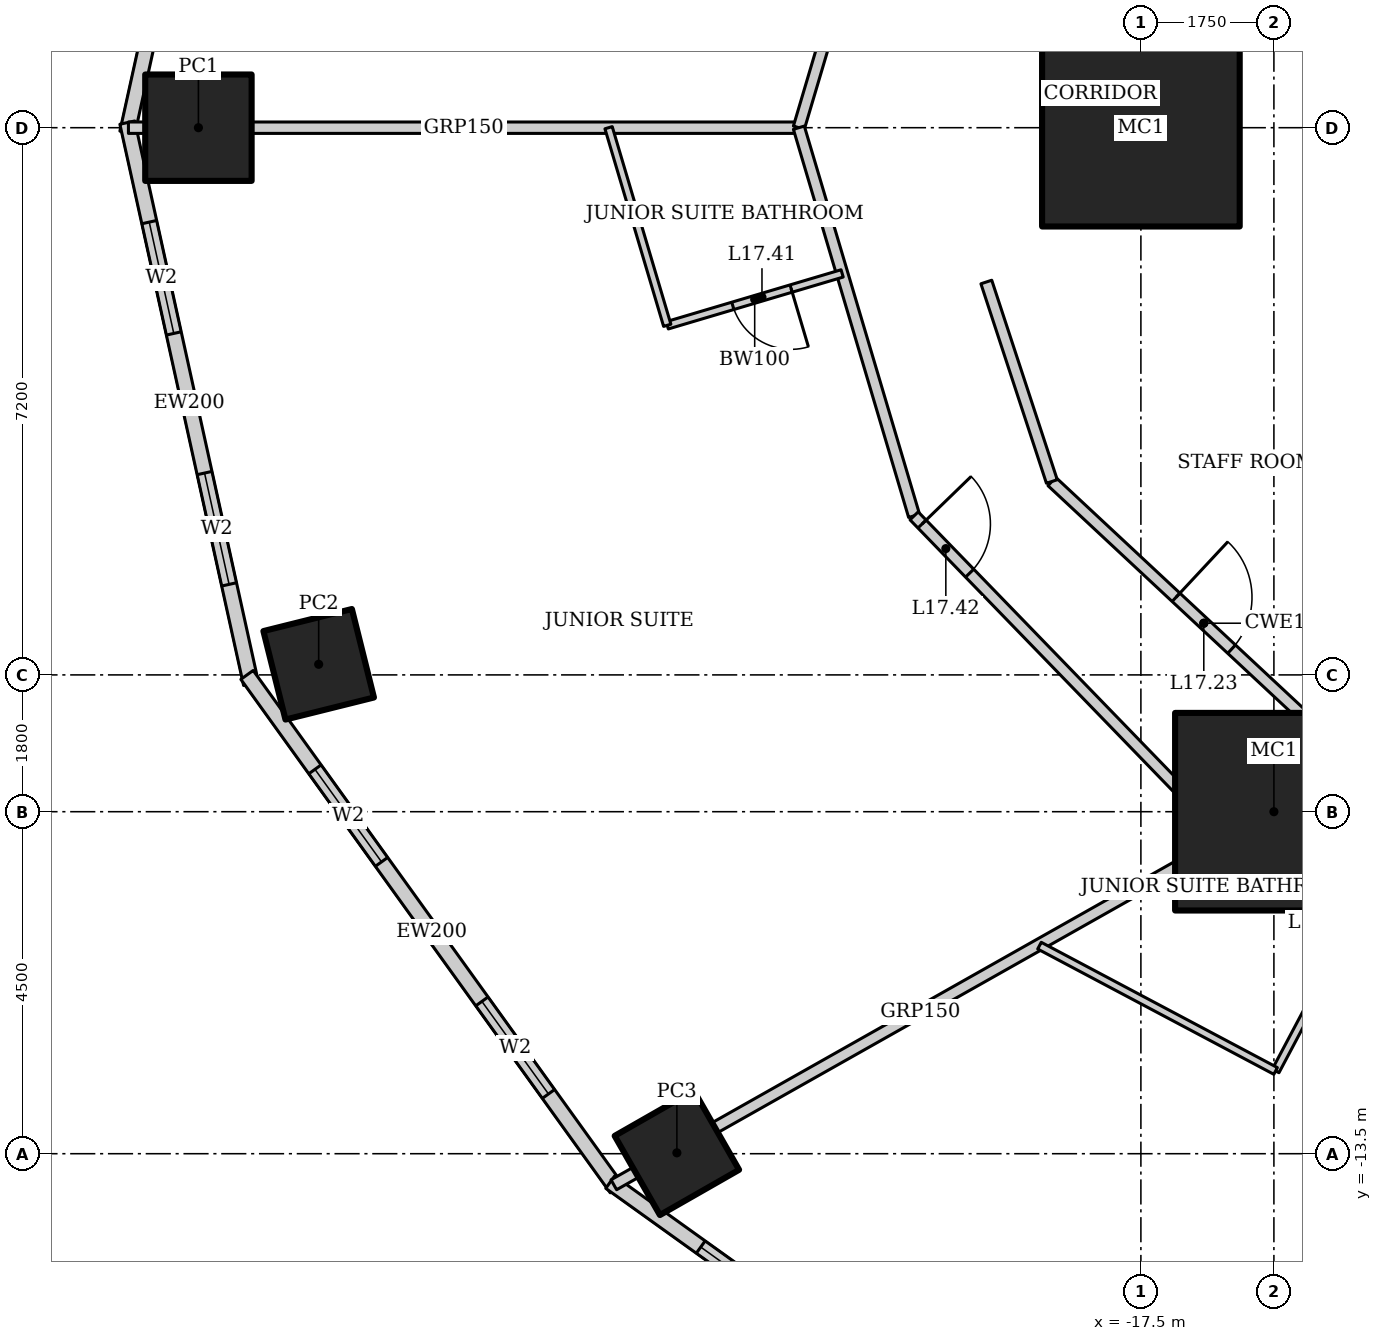
"""IFC4 building model, lengths in metres.
Left out: names, types, materials, properties, quantities, classifications, styles, units other than length and angle.
Written with IfcOpenShell. Run it as: python <this file> out.ifc"""

import sys

from ifc_helpers import new_model, si_unit, direction, frame, frame_2d, origin, origin_2d, place, context, subcontext, project, spatial, rectangle, hollow_rectangle, extrude, element, fill, save


model = new_model("IFC4")
c1 = context("Model", 3, precision=1e-05, world=origin(), true_north=direction((0.0, 1.0)))
c2 = subcontext(c1, "Body", "Model", "MODEL_VIEW")
j1 = project(units=[si_unit("LENGTHUNIT", "METRE"), si_unit("PLANEANGLEUNIT", "RADIAN")], contexts=[c1])
p1 = place(None, origin())
s1 = spatial("IfcSite", under=j1, at=p1, CompositionType="ELEMENT")
p2 = place(p1, origin())
s2 = spatial("IfcBuilding", under=s1, at=p2, CompositionType="ELEMENT")
p3 = place(p2, frame((0.0, 0.0, 76.6)))
s3 = spatial("IfcBuildingStorey", under=s2, at=p3, CompositionType="ELEMENT", Elevation=76.6)
for number, where, z_axis, x_axis in (
    (1, (-17.5, 0.0, 0.0), (0.0, 0.0, 1.0), (1.0, 0.0, 0.0)),
    (2, (-15.75, -9.0, 0.0), (0.0, 0.0, 1.0), (1.0, 0.0, 0.0)),
):
    element("IfcColumn", number, at=place(p3, frame(where, z_axis=z_axis, x_axis=x_axis)), inside=s3, PredefinedType="COLUMN", context=c2, shape_type="SweptSolid", body=[
        extrude(hollow_rectangle(XDim=2.6, YDim=2.6, WallThickness=0.13, at=origin_2d()), origin(), (0.0, 0.0, 1.0), 3.6),
    ])
p4 = place(p3, frame((-29.9, 0.0, 0.0), z_axis=(0.0, 0.0, 1.0), x_axis=(1.0, 0.0, 0.0)))
e3 = element("IfcColumn", 3, at=p4, inside=s3, PredefinedType="COLUMN", context=c2, shape_type="SweptSolid", body=[
    extrude(hollow_rectangle(XDim=1.4, YDim=1.4, WallThickness=0.1, at=origin_2d()), origin(), (0.0, 0.0, 1.0), 3.6),
])
p5 = place(p3, frame((-28.318, -7.06, 0.0), z_axis=(0.0, 0.0, 1.0), x_axis=(0.970295726276, 0.2419218956, 0.0)))
e4 = element("IfcColumn", 4, at=p5, inside=s3, PredefinedType="COLUMN", context=c2, shape_type="SweptSolid", body=[
    extrude(hollow_rectangle(XDim=1.2, YDim=1.2, WallThickness=0.1, at=origin_2d()), origin(), (0.0, 0.0, 1.0), 3.6),
])
p6 = place(p3, frame((-23.605, -13.489, 0.0), z_axis=(0.0, 0.0, 1.0), x_axis=(0.86824298017, 0.496139221777, 0.0)))
e5 = element("IfcColumn", 5, at=p6, inside=s3, PredefinedType="COLUMN", context=c2, shape_type="SweptSolid", body=[
    extrude(hollow_rectangle(XDim=1.2, YDim=1.2, WallThickness=0.12, at=origin_2d()), origin(), (0.0, 0.0, 1.0), 3.6),
])
p7 = place(p3, frame((-29.208, 7.318, 0.0), z_axis=(0.0, 0.0, 1.0), x_axis=(-0.215238065514, -0.976561608478, 0.0)))
e6 = element("IfcWall", 6, at=p7, inside=s3, PredefinedType="SOLIDWALL", context=c2, shape_type="SweptSolid", body=[
    extrude(rectangle(XDim=7.562, YDim=0.2, at=frame_2d((3.781, 0.0))), origin(), (0.0, 0.0, 1.0), 3.45),
])
p8 = place(p7, frame((1.341, 0.0, 0.5)))
e7 = element("IfcOpeningElement", 7, at=p8, cuts=e6, PredefinedType="OPENING", context=c2, shape_type="SweptSolid", body=[
    extrude(rectangle(XDim=1.5, YDim=2.2, at=frame_2d((0.75, 1.1))), frame((0.0, 0.11, 0.0), z_axis=(0.0, -1.0, 0.0), x_axis=(1.0, 0.0, 0.0)), (0.0, 0.0, 1.0), 0.22),
])
p9 = place(p7, frame((4.722, 0.0, 0.5)))
e8 = element("IfcOpeningElement", 8, at=p9, cuts=e6, PredefinedType="OPENING", context=c2, shape_type="SweptSolid", body=[
    extrude(rectangle(XDim=1.5, YDim=2.2, at=frame_2d((0.75, 1.1))), frame((0.0, 0.11, 0.0), z_axis=(0.0, -1.0, 0.0), x_axis=(1.0, 0.0, 0.0)), (0.0, 0.0, 1.0), 0.22),
])
p10 = place(p3, frame((-30.835, 0.067, 0.0), z_axis=(0.0, 0.0, 1.0), x_axis=(0.215238065514, -0.976561608478, 0.0)))
e9 = element("IfcWall", 9, at=p10, inside=s3, PredefinedType="SOLIDWALL", context=c2, shape_type="SweptSolid", body=[
    extrude(rectangle(XDim=7.562, YDim=0.2, at=frame_2d((3.781, 0.0))), origin(), (0.0, 0.0, 1.0), 3.45),
])
p11 = place(p10, frame((1.341, 0.0, 0.5)))
e10 = element("IfcOpeningElement", 10, at=p11, cuts=e9, PredefinedType="OPENING", context=c2, shape_type="SweptSolid", body=[
    extrude(rectangle(XDim=1.5, YDim=2.2, at=frame_2d((0.75, 1.1))), frame((0.0, 0.11, 0.0), z_axis=(0.0, -1.0, 0.0), x_axis=(1.0, 0.0, 0.0)), (0.0, 0.0, 1.0), 0.22),
])
p12 = place(p10, frame((4.722, 0.0, 0.5)))
e11 = element("IfcOpeningElement", 11, at=p12, cuts=e9, PredefinedType="OPENING", context=c2, shape_type="SweptSolid", body=[
    extrude(rectangle(XDim=1.5, YDim=2.2, at=frame_2d((0.75, 1.1))), frame((0.0, 0.11, 0.0), z_axis=(0.0, -1.0, 0.0), x_axis=(1.0, 0.0, 0.0)), (0.0, 0.0, 1.0), 0.22),
])
p13 = place(p3, frame((-29.26, -7.2, 0.0), z_axis=(0.0, 0.0, 1.0), x_axis=(0.583937613703, -0.811798536155, 0.0)))
e12 = element("IfcWall", 12, at=p13, inside=s3, PredefinedType="SOLIDWALL", context=c2, shape_type="SweptSolid", body=[
    extrude(rectangle(XDim=8.323, YDim=0.2, at=frame_2d((4.162, 0.0))), origin(), (0.0, 0.0, 1.0), 3.45),
])
p14 = place(p13, frame((1.531, 0.0, 0.5)))
e13 = element("IfcOpeningElement", 13, at=p14, cuts=e12, PredefinedType="OPENING", context=c2, shape_type="SweptSolid", body=[
    extrude(rectangle(XDim=1.5, YDim=2.2, at=frame_2d((0.75, 1.1))), frame((0.0, 0.11, 0.0), z_axis=(0.0, -1.0, 0.0), x_axis=(1.0, 0.0, 0.0)), (0.0, 0.0, 1.0), 0.22),
])
p15 = place(p13, frame((5.292, 0.0, 0.5)))
e14 = element("IfcOpeningElement", 14, at=p15, cuts=e12, PredefinedType="OPENING", context=c2, shape_type="SweptSolid", body=[
    extrude(rectangle(XDim=1.5, YDim=2.2, at=frame_2d((0.75, 1.1))), frame((0.0, 0.11, 0.0), z_axis=(0.0, -1.0, 0.0), x_axis=(1.0, 0.0, 0.0)), (0.0, 0.0, 1.0), 0.22),
])
p16 = place(p3, frame((-24.482, -13.875, 0.0), z_axis=(0.0, 0.0, 1.0), x_axis=(0.812791321576, -0.582554948112, 0.0)))
e15 = element("IfcWall", 15, at=p16, inside=s3, PredefinedType="SOLIDWALL", context=c2, shape_type="SweptSolid", body=[
    extrude(rectangle(XDim=8.063, YDim=0.2, at=frame_2d((4.032, 0.0))), origin(), (0.0, 0.0, 1.0), 3.45),
])
p17 = place(p16, frame((1.466, 0.0, 0.5)))
e16 = element("IfcOpeningElement", 16, at=p17, cuts=e15, PredefinedType="OPENING", context=c2, shape_type="SweptSolid", body=[
    extrude(rectangle(XDim=1.5, YDim=2.2, at=frame_2d((0.75, 1.1))), frame((0.0, 0.11, 0.0), z_axis=(0.0, -1.0, 0.0), x_axis=(1.0, 0.0, 0.0)), (0.0, 0.0, 1.0), 0.22),
])
p18 = place(p16, frame((5.097, 0.0, 0.5)))
e17 = element("IfcOpeningElement", 17, at=p18, cuts=e15, PredefinedType="OPENING", context=c2, shape_type="SweptSolid", body=[
    extrude(rectangle(XDim=1.5, YDim=2.2, at=frame_2d((0.75, 1.1))), frame((0.0, 0.11, 0.0), z_axis=(0.0, -1.0, 0.0), x_axis=(1.0, 0.0, 0.0)), (0.0, 0.0, 1.0), 0.22),
])
p19 = place(p3, frame((-30.821, 0.0, 0.0), z_axis=(0.0, 0.0, 1.0), x_axis=(1.0, 0.0, 0.0)))
e18 = element("IfcWall", 18, at=p19, inside=s3, PredefinedType="PARTITIONING", context=c2, shape_type="SweptSolid", body=[
    extrude(rectangle(XDim=8.821, YDim=0.15, at=frame_2d((4.41, 0.0))), origin(), (0.0, 0.0, 1.0), 2.528),
])
p20 = place(p3, frame((-24.435, -13.909, 0.0), z_axis=(0.0, 0.0, 1.0), x_axis=(0.870744406136, 0.491735883563, 0.0)))
e19 = element("IfcWall", 19, at=p20, inside=s3, PredefinedType="PARTITIONING", context=c2, shape_type="SweptSolid", body=[
    extrude(rectangle(XDim=9.263, YDim=0.15, at=frame_2d((4.631, 0.0))), origin(), (0.0, 0.0, 1.0), 2.693),
])
p21 = place(p3, frame((-20.484, 5.107, 0.0), z_axis=(0.0, 0.0, 1.0), x_axis=(-0.284584469409, -0.95865096869, 0.0)))
e20 = element("IfcWall", 20, at=p21, inside=s3, PredefinedType="PARTITIONING", context=c2, shape_type="SweptSolid", body=[
    extrude(rectangle(XDim=5.327, YDim=0.15, at=frame_2d((2.664, 0.0))), origin(), (0.0, 0.0, 1.0), 3.45),
])
p22 = place(p21, frame((0.15, 0.0, 0.0)))
e21 = element("IfcOpeningElement", 21, at=p22, cuts=e20, PredefinedType="OPENING", context=c2, shape_type="SweptSolid", body=[
    extrude(rectangle(XDim=0.9, YDim=2.1, at=frame_2d((0.45, 1.05))), frame((0.0, 0.085, 0.0), z_axis=(0.0, -1.0, 0.0), x_axis=(1.0, 0.0, 0.0)), (0.0, 0.0, 1.0), 0.17),
])
p23 = place(p3, frame((-22.0, 0.0, 0.0), z_axis=(0.0, 0.0, 1.0), x_axis=(0.284584469409, -0.95865096869, 0.0)))
e22 = element("IfcWall", 22, at=p23, inside=s3, PredefinedType="PARTITIONING", context=c2, shape_type="SweptSolid", body=[
    extrude(rectangle(XDim=5.327, YDim=0.15, at=frame_2d((2.664, 0.0))), origin(), (0.0, 0.0, 1.0), 3.45),
])
p24 = place(p3, frame((-20.484, -5.107, 0.0), z_axis=(0.0, 0.0, 1.0), x_axis=(0.695871090686, -0.71816671125, 0.0)))
e23 = element("IfcWall", 23, at=p24, inside=s3, PredefinedType="PARTITIONING", context=c2, shape_type="SweptSolid", body=[
    extrude(rectangle(XDim=5.913, YDim=0.15, at=frame_2d((2.957, 0.0))), origin(), (0.0, 0.0, 1.0), 3.45),
])
p25 = place(p24, frame((0.15, 0.0, 0.0)))
e24 = element("IfcOpeningElement", 24, at=p25, cuts=e23, PredefinedType="OPENING", context=c2, shape_type="SweptSolid", body=[
    extrude(rectangle(XDim=0.9, YDim=2.1, at=frame_2d((0.45, 1.05))), frame((0.0, 0.085, 0.0), z_axis=(0.0, -1.0, 0.0), x_axis=(1.0, 0.0, 0.0)), (0.0, 0.0, 1.0), 0.17),
])
p26 = place(p3, frame((-16.369, -9.354, 0.0), z_axis=(0.0, 0.0, 1.0), x_axis=(0.883334368785, -0.468743419071, 0.0)))
e25 = element("IfcWall", 25, at=p26, inside=s3, PredefinedType="PARTITIONING", context=c2, shape_type="SweptSolid", body=[
    extrude(rectangle(XDim=5.491, YDim=0.15, at=frame_2d((2.746, 0.0))), origin(), (0.0, 0.0, 1.0), 3.45),
])
p27 = place(p3, frame((-18.672, -4.655, 0.0), z_axis=(0.0, 0.0, 1.0), x_axis=(0.731260145007, -0.682098673452, 0.0)))
e26 = element("IfcWall", 26, at=p27, inside=s3, PredefinedType="PARTITIONING", context=c2, shape_type="SweptSolid", body=[
    extrude(rectangle(XDim=5.468, YDim=0.15, at=frame_2d((2.734, 0.0))), origin(), (0.0, 0.0, 1.0), 3.45),
])
p28 = place(p27, frame((2.234, 0.0, 0.0)))
e27 = element("IfcOpeningElement", 27, at=p28, cuts=e26, PredefinedType="OPENING", context=c2, shape_type="SweptSolid", body=[
    extrude(rectangle(XDim=1.0, YDim=2.1, at=frame_2d((0.5, 1.05))), frame((0.0, 0.085, 0.0), z_axis=(0.0, -1.0, 0.0), x_axis=(1.0, 0.0, 0.0)), (0.0, 0.0, 1.0), 0.17),
])
p29 = place(p3, frame((-21.431, -1.917, 0.0), z_axis=(0.0, 0.0, 1.0), x_axis=(-0.958639927723, -0.284621659356, 0.0)))
e28 = element("IfcWall", 28, at=p29, inside=s3, PredefinedType="PARTITIONING", context=c2, shape_type="SweptSolid", body=[
    extrude(rectangle(XDim=2.4, YDim=0.1, at=frame_2d((1.2, 0.0))), origin(), (0.0, 0.0, 1.0), 3.45),
])
p30 = place(p29, frame((0.7, 0.0, 0.0)))
e29 = element("IfcOpeningElement", 29, at=p30, cuts=e28, PredefinedType="OPENING", context=c2, shape_type="SweptSolid", body=[
    extrude(rectangle(XDim=0.8, YDim=2.1, at=frame_2d((0.4, 1.05))), frame((0.0, 0.06, 0.0), z_axis=(0.0, -1.0, 0.0), x_axis=(1.0, 0.0, 0.0)), (0.0, 0.0, 1.0), 0.12),
])
p31 = place(p3, frame((-23.732, -2.6, 0.0), z_axis=(0.0, 0.0, 1.0), x_axis=(-0.284514277473, 0.958671803025, 0.0)))
e30 = element("IfcWall", 30, at=p31, inside=s3, PredefinedType="PARTITIONING", context=c2, shape_type="SweptSolid", body=[
    extrude(rectangle(XDim=2.712, YDim=0.1, at=frame_2d((1.356, 0.0))), origin(), (0.0, 0.0, 1.0), 3.45),
])
p32 = place(p3, frame((-14.602, -10.291, 0.0), z_axis=(0.0, 0.0, 1.0), x_axis=(-0.468770886208, -0.883319792739, 0.0)))
e31 = element("IfcWall", 31, at=p32, inside=s3, PredefinedType="PARTITIONING", context=c2, shape_type="SweptSolid", body=[
    extrude(rectangle(XDim=2.4, YDim=0.1, at=frame_2d((1.2, 0.0))), origin(), (0.0, 0.0, 1.0), 3.45),
])
p33 = place(p32, frame((0.7, 0.0, 0.0)))
e32 = element("IfcOpeningElement", 32, at=p33, cuts=e31, PredefinedType="OPENING", context=c2, shape_type="SweptSolid", body=[
    extrude(rectangle(XDim=0.8, YDim=2.1, at=frame_2d((0.4, 1.05))), frame((0.0, 0.06, 0.0), z_axis=(0.0, -1.0, 0.0), x_axis=(1.0, 0.0, 0.0)), (0.0, 0.0, 1.0), 0.12),
])
p34 = place(p3, frame((-15.727, -12.411, 0.0), z_axis=(0.0, 0.0, 1.0), x_axis=(-0.88335195308, 0.468710280439, 0.0)))
e33 = element("IfcWall", 33, at=p34, inside=s3, PredefinedType="PARTITIONING", context=c2, shape_type="SweptSolid", body=[
    extrude(rectangle(XDim=3.518, YDim=0.1, at=frame_2d((1.759, 0.0))), origin(), (0.0, 0.0, 1.0), 3.45),
])
p35 = place(p3, frame((-19.533, -2.03, 0.0), z_axis=(0.0, 0.0, 1.0), x_axis=(0.311929965981, -0.950105097515, 0.0)))
e34 = element("IfcWall", 34, at=p35, inside=s3, PredefinedType="PARTITIONING", context=c2, shape_type="SweptSolid", body=[
    extrude(rectangle(XDim=2.763, YDim=0.15, at=frame_2d((1.381, 0.0))), origin(), (0.0, 0.0, 1.0), 3.45),
])
p36 = place(p11, origin())
e35 = element("IfcWindow", 35, at=p36, inside=s3, PartitioningType="SINGLE_PANEL", PredefinedType="WINDOW", context=c2, shape_type="SweptSolid", body=[
    extrude(rectangle(XDim=1.5, YDim=2.2, at=frame_2d((0.75, 1.1))), frame((0.0, 0.03, 0.0), z_axis=(0.0, -1.0, 0.0), x_axis=(1.0, 0.0, 0.0)), (0.0, 0.0, 1.0), 0.06),
])
fill(e10, e35)
p37 = place(p12, origin())
e36 = element("IfcWindow", 36, at=p37, inside=s3, PartitioningType="SINGLE_PANEL", PredefinedType="WINDOW", context=c2, shape_type="SweptSolid", body=[
    extrude(rectangle(XDim=1.5, YDim=2.2, at=frame_2d((0.75, 1.1))), frame((0.0, 0.03, 0.0), z_axis=(0.0, -1.0, 0.0), x_axis=(1.0, 0.0, 0.0)), (0.0, 0.0, 1.0), 0.06),
])
fill(e11, e36)
p38 = place(p14, origin())
e37 = element("IfcWindow", 37, at=p38, inside=s3, PartitioningType="SINGLE_PANEL", PredefinedType="WINDOW", context=c2, shape_type="SweptSolid", body=[
    extrude(rectangle(XDim=1.5, YDim=2.2, at=frame_2d((0.75, 1.1))), frame((0.0, 0.03, 0.0), z_axis=(0.0, -1.0, 0.0), x_axis=(1.0, 0.0, 0.0)), (0.0, 0.0, 1.0), 0.06),
])
fill(e13, e37)
p39 = place(p15, origin())
e38 = element("IfcWindow", 38, at=p39, inside=s3, PartitioningType="SINGLE_PANEL", PredefinedType="WINDOW", context=c2, shape_type="SweptSolid", body=[
    extrude(rectangle(XDim=1.5, YDim=2.2, at=frame_2d((0.75, 1.1))), frame((0.0, 0.03, 0.0), z_axis=(0.0, -1.0, 0.0), x_axis=(1.0, 0.0, 0.0)), (0.0, 0.0, 1.0), 0.06),
])
fill(e14, e38)
p40 = place(p17, origin())
e39 = element("IfcWindow", 39, at=p40, inside=s3, PartitioningType="SINGLE_PANEL", PredefinedType="WINDOW", context=c2, shape_type="SweptSolid", body=[
    extrude(rectangle(XDim=1.5, YDim=2.2, at=frame_2d((0.75, 1.1))), frame((0.0, 0.03, 0.0), z_axis=(0.0, -1.0, 0.0), x_axis=(1.0, 0.0, 0.0)), (0.0, 0.0, 1.0), 0.06),
])
fill(e16, e39)
p41 = place(p28, origin())
e40 = element("IfcDoor", 40, at=p41, inside=s3, OperationType="SINGLE_SWING_LEFT", PredefinedType="DOOR", context=c2, shape_type="SweptSolid", body=[
    extrude(rectangle(XDim=1.0, YDim=2.1, at=frame_2d((0.5, 1.05))), frame((0.0, 0.025, 0.0), z_axis=(0.0, -1.0, 0.0), x_axis=(1.0, 0.0, 0.0)), (0.0, 0.0, 1.0), 0.05),
])
fill(e27, e40)
p42 = place(p30, origin())
e41 = element("IfcDoor", 41, at=p42, inside=s3, OperationType="SINGLE_SWING_LEFT", PredefinedType="DOOR", context=c2, shape_type="SweptSolid", body=[
    extrude(rectangle(XDim=0.8, YDim=2.1, at=frame_2d((0.4, 1.05))), frame((0.0, 0.025, 0.0), z_axis=(0.0, -1.0, 0.0), x_axis=(1.0, 0.0, 0.0)), (0.0, 0.0, 1.0), 0.05),
])
fill(e29, e41)
p43 = place(p25, origin())
e42 = element("IfcDoor", 42, at=p43, inside=s3, OperationType="SINGLE_SWING_LEFT", PredefinedType="DOOR", context=c2, shape_type="SweptSolid", body=[
    extrude(rectangle(XDim=0.9, YDim=2.1, at=frame_2d((0.45, 1.05))), frame((0.0, 0.025, 0.0), z_axis=(0.0, -1.0, 0.0), x_axis=(1.0, 0.0, 0.0)), (0.0, 0.0, 1.0), 0.05),
])
fill(e24, e42)
save(model, sys.argv[1])
